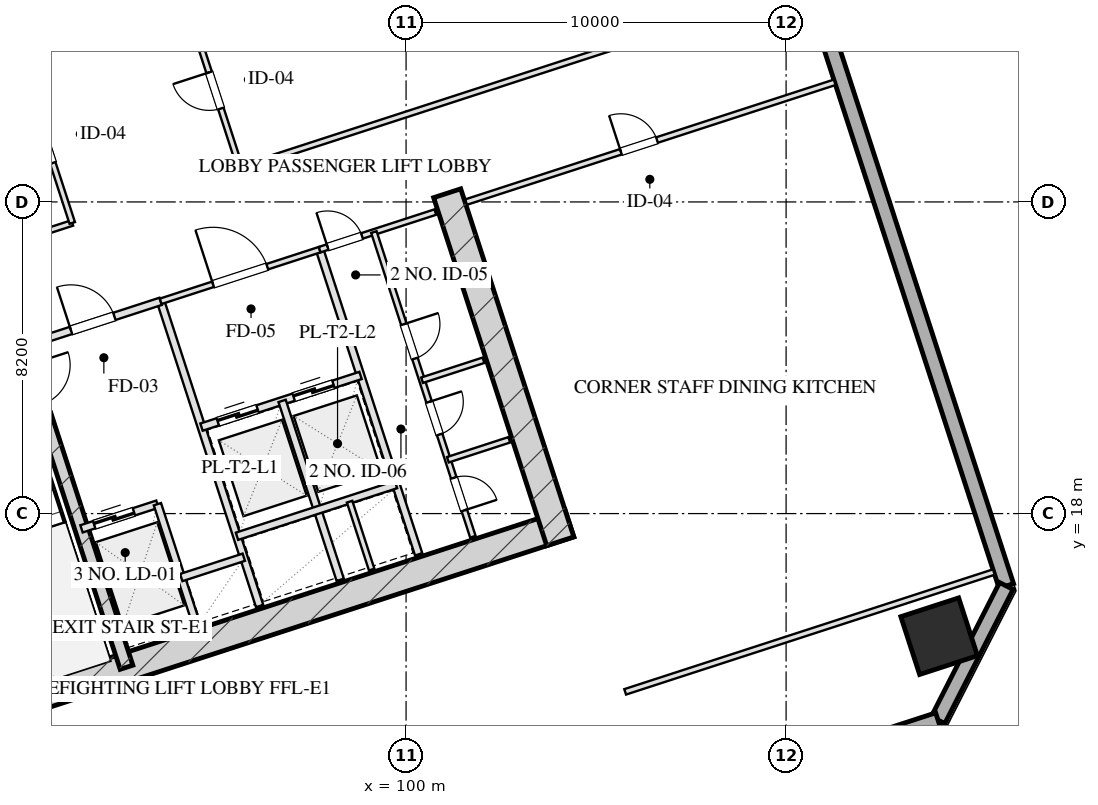
"""IFC4 building model, lengths in metres.
Left out: names, types, materials, properties, quantities, classifications, styles, units other than length and angle.
Written with IfcOpenShell. Run it as: python <this file> out.ifc"""

import sys

from ifc_helpers import new_model, si_unit, direction, frame, frame_2d, origin, origin_2d, place, context, subcontext, project, spatial, rectangle, hollow_rectangle, extrude, element, fill, save


model = new_model("IFC4")
c1 = context("Model", 3, precision=1e-05, world=origin(), true_north=direction((0.0, 1.0)))
c2 = subcontext(c1, "Body", "Model", "MODEL_VIEW")
j1 = project(units=[si_unit("LENGTHUNIT", "METRE"), si_unit("PLANEANGLEUNIT", "RADIAN")], contexts=[c1])
p1 = place(None, origin())
s1 = spatial("IfcSite", under=j1, at=p1, CompositionType="ELEMENT")
p2 = place(p1, origin())
s2 = spatial("IfcBuilding", under=s1, at=p2, CompositionType="ELEMENT")
p3 = place(p2, frame((0.0, 0.0, 64.4)))
s3 = spatial("IfcBuildingStorey", under=s2, at=p3, CompositionType="ELEMENT", Elevation=64.4)
p4 = place(p3, frame((88.559, 12.629, 0.0), z_axis=(0.0, 0.0, 1.0), x_axis=(0.951056072937, 0.309018358888, 0.0)))
e1 = element("IfcWall", 1, at=p4, inside=s3, PredefinedType="SHEAR", context=c2, shape_type="SweptSolid", body=[
    extrude(rectangle(XDim=16.55, YDim=0.75, at=frame_2d((8.275, 0.0))), origin(), (0.0, 0.0, 1.0), 3.45),
])
p5 = place(p3, frame((101.082, 26.429, 0.0), z_axis=(0.0, 0.0, 1.0), x_axis=(0.309016134813, -0.951056795583, 0.0)))
e2 = element("IfcWall", 2, at=p5, inside=s3, PredefinedType="SHEAR", context=c2, shape_type="SweptSolid", body=[
    extrude(rectangle(XDim=9.63, YDim=0.75, at=frame_2d((4.815, 0.0))), origin(), (0.0, 0.0, 1.0), 3.45),
])
p6 = place(p3, frame((90.486, 20.594, 0.0), z_axis=(0.0, 0.0, 1.0), x_axis=(0.309020428229, -0.951055400562, 0.0)))
e3 = element("IfcWall", 3, at=p6, inside=s3, PredefinedType="SHEAR", context=c2, shape_type="SweptSolid", body=[
    extrude(rectangle(XDim=6.98, YDim=0.35, at=frame_2d((3.49, 0.0))), origin(), (0.0, 0.0, 1.0), 3.45),
])
p7 = place(p3, frame((114.027, 14.774, 0.0), z_axis=(0.0, 0.0, 1.0), x_axis=(0.951056516295, 0.309016994375, 0.0)))
e4 = element("IfcColumn", 4, at=p7, inside=s3, PredefinedType="COLUMN", context=c2, shape_type="SweptSolid", body=[
    extrude(hollow_rectangle(XDim=1.6, YDim=1.6, WallThickness=0.055, at=origin_2d()), origin(), (0.0, 0.0, 1.0), 3.451),
])
p8 = place(p3, frame((100.345, 63.648, 0.0), z_axis=(0.0, 0.0, 1.0), x_axis=(0.309014526607, -0.951057318118, 0.0)))
e5 = element("IfcWall", 5, at=p8, inside=s3, PredefinedType="SOLIDWALL", context=c2, shape_type="SweptSolid", body=[
    extrude(rectangle(XDim=50.0, YDim=0.4, at=frame_2d((25.0, 0.0))), origin(), (0.0, 0.0, 1.0), 2.61),
])
p9 = place(p8, frame((30.15, 0.0, 0.75)))
e6 = element("IfcOpeningElement", 6, at=p9, cuts=e5, PredefinedType="OPENING", context=c2, shape_type="SweptSolid", body=[
    extrude(rectangle(XDim=2.5, YDim=1.46, at=frame_2d((1.25, 0.73))), frame((0.0, 0.21, 0.0), z_axis=(0.0, -1.0, 0.0), x_axis=(1.0, 0.0, 0.0)), (0.0, 0.0, 1.0), 0.42),
])
p10 = place(p8, frame((21.15, 0.0, 0.75)))
e7 = element("IfcOpeningElement", 7, at=p10, cuts=e5, PredefinedType="OPENING", context=c2, shape_type="SweptSolid", body=[
    extrude(rectangle(XDim=2.5, YDim=1.46, at=frame_2d((1.25, 0.73))), frame((0.0, 0.21, 0.0), z_axis=(0.0, -1.0, 0.0), x_axis=(1.0, 0.0, 0.0)), (0.0, 0.0, 1.0), 0.42),
])
p11 = place(p8, frame((17.35, 0.0, 0.75)))
e8 = element("IfcOpeningElement", 8, at=p11, cuts=e5, PredefinedType="OPENING", context=c2, shape_type="SweptSolid", body=[
    extrude(rectangle(XDim=2.5, YDim=1.46, at=frame_2d((1.25, 0.73))), frame((0.0, 0.21, 0.0), z_axis=(0.0, -1.0, 0.0), x_axis=(1.0, 0.0, 0.0)), (0.0, 0.0, 1.0), 0.42),
])
p12 = place(p3, frame((115.795, 16.095, 0.0), z_axis=(0.0, 0.0, 1.0), x_axis=(-0.453958106755, -0.891023028497, 0.0)))
e9 = element("IfcWall", 9, at=p12, inside=s3, PredefinedType="SOLIDWALL", context=c2, shape_type="SweptSolid", body=[
    extrude(rectangle(XDim=3.96, YDim=0.4, at=frame_2d((1.98, 0.0))), origin(), (0.0, 0.0, 1.0), 2.61),
])
p13 = place(p3, frame((113.998, 12.567, 0.0), z_axis=(0.0, 0.0, 1.0), x_axis=(-0.951055939317, -0.309018770125, 0.0)))
e10 = element("IfcWall", 10, at=p13, inside=s3, PredefinedType="SOLIDWALL", context=c2, shape_type="SweptSolid", body=[
    extrude(rectangle(XDim=32.4, YDim=0.4, at=frame_2d((16.2, 0.0))), origin(), (0.0, 0.0, 1.0), 2.61),
])
p14 = place(p3, frame((93.542, 23.585, 0.0), z_axis=(0.0, 0.0, 1.0), x_axis=(0.309042196757, -0.951048327176, 0.0)))
e11 = element("IfcWall", 11, at=p14, inside=s3, PredefinedType="PARTITIONING", context=c2, shape_type="SweptSolid", body=[
    extrude(rectangle(XDim=8.43, YDim=0.2, at=frame_2d((4.215, 0.0))), origin(), (0.0, 0.0, 1.0), 3.175),
])
p15 = place(p3, frame((89.899, 22.401, 0.0), z_axis=(0.0, 0.0, 1.0), x_axis=(0.951046716504, 0.309047153403, 0.0)))
e12 = element("IfcWall", 12, at=p15, inside=s3, PredefinedType="PARTITIONING", context=c2, shape_type="SweptSolid", body=[
    extrude(rectangle(XDim=3.83, YDim=0.2, at=frame_2d((1.915, 0.0))), origin(), (0.0, 0.0, 1.0), 3.175),
])
p16 = place(p15, frame((1.35, 0.0, 0.0)))
e13 = element("IfcOpeningElement", 13, at=p16, cuts=e12, PredefinedType="OPENING", context=c2, shape_type="SweptSolid", body=[
    extrude(rectangle(XDim=1.2, YDim=2.05, at=frame_2d((0.6, 1.025))), frame((0.0, 0.11, 0.0), z_axis=(0.0, -1.0, 0.0), x_axis=(1.0, 0.0, 0.0)), (0.0, 0.0, 1.0), 0.22),
])
p17 = place(p3, frame((91.46, 17.598, 0.0), z_axis=(0.0, 0.0, 1.0), x_axis=(0.951062257173, 0.308999325213, 0.0)))
e14 = element("IfcWall", 14, at=p17, inside=s3, PredefinedType="PARTITIONING", context=c2, shape_type="SweptSolid", body=[
    extrude(rectangle(XDim=2.1, YDim=0.2, at=frame_2d((1.05, 0.0))), origin(), (0.0, 0.0, 1.0), 3.175),
])
p18 = place(p17, frame((0.35, 0.0, 0.0)))
e15 = element("IfcOpeningElement", 15, at=p18, cuts=e14, PredefinedType="OPENING", context=c2, shape_type="SweptSolid", body=[
    extrude(rectangle(XDim=1.1, YDim=2.05, at=frame_2d((0.55, 1.025))), frame((0.0, 0.11, 0.0), z_axis=(0.0, -1.0, 0.0), x_axis=(1.0, 0.0, 0.0)), (0.0, 0.0, 1.0), 0.22),
])
p19 = place(p3, frame((93.457, 18.247, 0.0), z_axis=(0.0, 0.0, 1.0), x_axis=(0.3089935693, -0.951064127245, 0.0)))
e16 = element("IfcWall", 16, at=p19, inside=s3, PredefinedType="PARTITIONING", context=c2, shape_type="SweptSolid", body=[
    extrude(rectangle(XDim=3.7, YDim=0.2, at=frame_2d((1.85, 0.0))), origin(), (0.0, 0.0, 1.0), 3.175),
])
p20 = place(p3, frame((94.084, 16.317, 0.0), z_axis=(0.0, 0.0, 1.0), x_axis=(0.951041328149, 0.309063734775, 0.0)))
e17 = element("IfcWall", 17, at=p20, inside=s3, PredefinedType="PARTITIONING", context=c2, shape_type="SweptSolid", body=[
    extrude(rectangle(XDim=1.73, YDim=0.2, at=frame_2d((0.865, 0.0))), origin(), (0.0, 0.0, 1.0), 3.175),
])
p21 = place(p3, frame((97.727, 24.944, 0.0), z_axis=(0.0, 0.0, 1.0), x_axis=(0.309016001439, -0.951056838919, 0.0)))
e18 = element("IfcWall", 18, at=p21, inside=s3, PredefinedType="PARTITIONING", context=c2, shape_type="SweptSolid", body=[
    extrude(rectangle(XDim=8.43, YDim=0.2, at=frame_2d((4.215, 0.0))), origin(), (0.0, 0.0, 1.0), 3.175),
])
p22 = place(p3, frame((93.542, 23.585, 0.0), z_axis=(0.0, 0.0, 1.0), x_axis=(0.951063829732, 0.308994485023, 0.0)))
e19 = element("IfcWall", 19, at=p22, inside=s3, PredefinedType="PARTITIONING", context=c2, shape_type="SweptSolid", body=[
    extrude(rectangle(XDim=4.4, YDim=0.15, at=frame_2d((2.2, 0.0))), origin(), (0.0, 0.0, 1.0), 3.175),
])
p23 = place(p22, frame((1.45, 0.0, 0.0)))
e20 = element("IfcOpeningElement", 20, at=p23, cuts=e19, PredefinedType="OPENING", context=c2, shape_type="SweptSolid", body=[
    extrude(rectangle(XDim=1.5, YDim=2.05, at=frame_2d((0.75, 1.025))), frame((0.0, 0.085, 0.0), z_axis=(0.0, -1.0, 0.0), x_axis=(1.0, 0.0, 0.0)), (0.0, 0.0, 1.0), 0.17),
])
p24 = place(p3, frame((94.617, 20.275, 0.0), z_axis=(0.0, 0.0, 1.0), x_axis=(0.951058531764, 0.30901079133, 0.0)))
e21 = element("IfcWall", 21, at=p24, inside=s3, PredefinedType="PARTITIONING", context=c2, shape_type="SweptSolid", body=[
    extrude(rectangle(XDim=4.4, YDim=0.2, at=frame_2d((2.2, 0.0))), origin(), (0.0, 0.0, 1.0), 3.175),
])
p25 = place(p24, frame((0.45, 0.0, 0.0)))
e22 = element("IfcOpeningElement", 22, at=p25, cuts=e21, PredefinedType="OPENING", context=c2, shape_type="SweptSolid", body=[
    extrude(rectangle(XDim=1.1, YDim=2.05, at=frame_2d((0.55, 1.025))), frame((0.0, 0.11, 0.0), z_axis=(0.0, -1.0, 0.0), x_axis=(1.0, 0.0, 0.0)), (0.0, 0.0, 1.0), 0.22),
])
p26 = place(p24, frame((2.55, 0.0, 0.0)))
e23 = element("IfcOpeningElement", 23, at=p26, cuts=e21, PredefinedType="OPENING", context=c2, shape_type="SweptSolid", body=[
    extrude(rectangle(XDim=1.1, YDim=2.05, at=frame_2d((0.55, 1.025))), frame((0.0, 0.11, 0.0), z_axis=(0.0, -1.0, 0.0), x_axis=(1.0, 0.0, 0.0)), (0.0, 0.0, 1.0), 0.22),
])
p27 = place(p3, frame((96.738, 20.964, 0.0), z_axis=(0.0, 0.0, 1.0), x_axis=(0.309042578481, -0.951048203135, 0.0)))
e24 = element("IfcWall", 24, at=p27, inside=s3, PredefinedType="PARTITIONING", context=c2, shape_type="SweptSolid", body=[
    extrude(rectangle(XDim=4.95, YDim=0.2, at=frame_2d((2.475, 0.0))), origin(), (0.0, 0.0, 1.0), 3.175),
])
p28 = place(p3, frame((95.551, 17.403, 0.0), z_axis=(0.0, 0.0, 1.0), x_axis=(0.951058531764, 0.30901079133, 0.0)))
e25 = element("IfcWall", 25, at=p28, inside=s3, PredefinedType="PARTITIONING", context=c2, shape_type="SweptSolid", body=[
    extrude(rectangle(XDim=4.4, YDim=0.2, at=frame_2d((2.2, 0.0))), origin(), (0.0, 0.0, 1.0), 3.175),
])
p29 = place(p3, frame((98.514, 18.313, 0.0), z_axis=(0.0, 0.0, 1.0), x_axis=(0.309089008895, -0.951033114345, 0.0)))
e26 = element("IfcWall", 26, at=p29, inside=s3, PredefinedType="PARTITIONING", context=c2, shape_type="SweptSolid", body=[
    extrude(rectangle(XDim=1.88, YDim=0.15, at=frame_2d((0.94, 0.0))), origin(), (0.0, 0.0, 1.0), 3.175),
])
p30 = place(p3, frame((97.727, 24.944, 0.0), z_axis=(0.0, 0.0, 1.0), x_axis=(0.951036872128, 0.309077446369, 0.0)))
e27 = element("IfcWall", 27, at=p30, inside=s3, PredefinedType="PARTITIONING", context=c2, shape_type="SweptSolid", body=[
    extrude(rectangle(XDim=3.2, YDim=0.15, at=frame_2d((1.6, 0.0))), origin(), (0.0, 0.0, 1.0), 3.175),
])
p31 = place(p30, frame((0.22, 0.0, 0.0)))
e28 = element("IfcOpeningElement", 28, at=p31, cuts=e27, PredefinedType="OPENING", context=c2, shape_type="SweptSolid", body=[
    extrude(rectangle(XDim=0.95, YDim=2.05, at=frame_2d((0.475, 1.025))), frame((0.0, 0.085, 0.0), z_axis=(0.0, -1.0, 0.0), x_axis=(1.0, 0.0, 0.0)), (0.0, 0.0, 1.0), 0.17),
])
p32 = place(p3, frame((99.153, 25.408, 0.0), z_axis=(0.0, 0.0, 1.0), x_axis=(0.309016001439, -0.951056838919, 0.0)))
e29 = element("IfcWall", 29, at=p32, inside=s3, PredefinedType="PARTITIONING", context=c2, shape_type="SweptSolid", body=[
    extrude(rectangle(XDim=8.43, YDim=0.15, at=frame_2d((4.215, 0.0))), origin(), (0.0, 0.0, 1.0), 3.175),
])
p33 = place(p32, frame((2.55, 0.0, 0.0)))
e30 = element("IfcOpeningElement", 30, at=p33, cuts=e29, PredefinedType="OPENING", context=c2, shape_type="SweptSolid", body=[
    extrude(rectangle(XDim=0.95, YDim=2.05, at=frame_2d((0.475, 1.025))), frame((0.0, 0.085, 0.0), z_axis=(0.0, -1.0, 0.0), x_axis=(1.0, 0.0, 0.0)), (0.0, 0.0, 1.0), 0.17),
])
p34 = place(p32, frame((4.7, 0.0, 0.0)))
e31 = element("IfcOpeningElement", 31, at=p34, cuts=e29, PredefinedType="OPENING", context=c2, shape_type="SweptSolid", body=[
    extrude(rectangle(XDim=0.9, YDim=2.05, at=frame_2d((0.45, 1.025))), frame((0.0, 0.085, 0.0), z_axis=(0.0, -1.0, 0.0), x_axis=(1.0, 0.0, 0.0)), (0.0, 0.0, 1.0), 0.17),
])
p35 = place(p32, frame((6.8, 0.0, 0.0)))
e32 = element("IfcOpeningElement", 32, at=p35, cuts=e29, PredefinedType="OPENING", context=c2, shape_type="SweptSolid", body=[
    extrude(rectangle(XDim=0.9, YDim=2.05, at=frame_2d((0.45, 1.025))), frame((0.0, 0.085, 0.0), z_axis=(0.0, -1.0, 0.0), x_axis=(1.0, 0.0, 0.0)), (0.0, 0.0, 1.0), 0.17),
])
p36 = place(p3, frame((100.42, 21.509, 0.0), z_axis=(0.0, 0.0, 1.0), x_axis=(0.951040401051, 0.309066587596, 0.0)))
e33 = element("IfcWall", 33, at=p36, inside=s3, PredefinedType="PARTITIONING", context=c2, shape_type="SweptSolid", body=[
    extrude(rectangle(XDim=1.7, YDim=0.15, at=frame_2d((0.85, 0.0))), origin(), (0.0, 0.0, 1.0), 3.175),
])
p37 = place(p3, frame((101.1, 19.416, 0.0), z_axis=(0.0, 0.0, 1.0), x_axis=(0.951054116971, 0.309024378638, 0.0)))
e34 = element("IfcWall", 34, at=p37, inside=s3, PredefinedType="PARTITIONING", context=c2, shape_type="SweptSolid", body=[
    extrude(rectangle(XDim=1.7, YDim=0.15, at=frame_2d((0.85, 0.0))), origin(), (0.0, 0.0, 1.0), 3.175),
])
p38 = place(p3, frame((105.765, 13.309, 0.0), z_axis=(0.0, 0.0, 1.0), x_axis=(0.951054294345, 0.309023832749, 0.0)))
e35 = element("IfcWall", 35, at=p38, inside=s3, PredefinedType="PARTITIONING", context=c2, shape_type="SweptSolid", body=[
    extrude(rectangle(XDim=10.2, YDim=0.15, at=frame_2d((5.1, 0.0))), origin(), (0.0, 0.0, 1.0), 3.175),
])
p39 = place(p3, frame((101.578, 26.196, 0.0), z_axis=(0.0, 0.0, 1.0), x_axis=(0.951059043131, 0.309009217467, 0.0)))
e36 = element("IfcWall", 36, at=p39, inside=s3, PredefinedType="PARTITIONING", context=c2, shape_type="SweptSolid", body=[
    extrude(rectangle(XDim=10.2, YDim=0.15, at=frame_2d((5.1, 0.0))), origin(), (0.0, 0.0, 1.0), 3.175),
])
p40 = place(p39, frame((4.284, 0.0, 0.0)))
e37 = element("IfcOpeningElement", 37, at=p40, cuts=e36, PredefinedType="OPENING", context=c2, shape_type="SweptSolid", body=[
    extrude(rectangle(XDim=1.0, YDim=2.05, at=frame_2d((0.5, 1.025))), frame((0.0, 0.085, 0.0), z_axis=(0.0, -1.0, 0.0), x_axis=(1.0, 0.0, 0.0)), (0.0, 0.0, 1.0), 0.17),
])
p41 = place(p3, frame((74.691, 20.278, 0.0), z_axis=(0.0, 0.0, 1.0), x_axis=(0.951053169828, 0.309027293551, 0.0)))
e38 = element("IfcWall", 38, at=p41, inside=s3, PredefinedType="PARTITIONING", context=c2, shape_type="SweptSolid", body=[
    extrude(rectangle(XDim=17.375, YDim=0.15, at=frame_2d((8.688, 0.0))), origin(), (0.0, 0.0, 1.0), 3.175),
])
p42 = place(p3, frame((95.638, 27.084, 0.0), z_axis=(0.0, 0.0, 1.0), x_axis=(0.951055837847, 0.309019082414, 0.0)))
e39 = element("IfcWall", 39, at=p42, inside=s3, PredefinedType="PARTITIONING", context=c2, shape_type="SweptSolid", body=[
    extrude(rectangle(XDim=15.575, YDim=0.15, at=frame_2d((7.788, 0.0))), origin(), (0.0, 0.0, 1.0), 3.175),
])
p43 = place(p3, frame((91.216, 25.647, 0.0), z_axis=(0.0, 0.0, 1.0), x_axis=(-0.309022042254, 0.951054876125, 0.0)))
e40 = element("IfcWall", 40, at=p43, inside=s3, PredefinedType="PARTITIONING", context=c2, shape_type="SweptSolid", body=[
    extrude(rectangle(XDim=16.64, YDim=0.15, at=frame_2d((8.32, 0.0))), origin(), (0.0, 0.0, 1.0), 3.175),
])
p44 = place(p43, frame((1.66, 0.0, 0.0)))
e41 = element("IfcOpeningElement", 41, at=p44, cuts=e40, PredefinedType="OPENING", context=c2, shape_type="SweptSolid", body=[
    extrude(rectangle(XDim=1.0, YDim=2.05, at=frame_2d((0.5, 1.025))), frame((0.0, 0.085, 0.0), z_axis=(0.0, -1.0, 0.0), x_axis=(1.0, 0.0, 0.0)), (0.0, 0.0, 1.0), 0.17),
])
p45 = place(p43, frame((7.82, 0.0, 0.0)))
e42 = element("IfcOpeningElement", 42, at=p45, cuts=e40, PredefinedType="OPENING", context=c2, shape_type="SweptSolid", body=[
    extrude(rectangle(XDim=1.05, YDim=2.05, at=frame_2d((0.525, 1.025))), frame((0.0, 0.085, 0.0), z_axis=(0.0, -1.0, 0.0), x_axis=(1.0, 0.0, 0.0)), (0.0, 0.0, 1.0), 0.17),
])
p46 = place(p43, frame((13.98, 0.0, 0.0)))
e43 = element("IfcOpeningElement", 43, at=p46, cuts=e40, PredefinedType="OPENING", context=c2, shape_type="SweptSolid", body=[
    extrude(rectangle(XDim=1.0, YDim=2.05, at=frame_2d((0.5, 1.025))), frame((0.0, 0.085, 0.0), z_axis=(0.0, -1.0, 0.0), x_axis=(1.0, 0.0, 0.0)), (0.0, 0.0, 1.0), 0.17),
])
p47 = place(p3, frame((95.638, 27.084, 0.0), z_axis=(0.0, 0.0, 1.0), x_axis=(-0.30901773025, 0.951056277195, 0.0)))
e44 = element("IfcWall", 44, at=p47, inside=s3, PredefinedType="PARTITIONING", context=c2, shape_type="SweptSolid", body=[
    extrude(rectangle(XDim=16.64, YDim=0.15, at=frame_2d((8.32, 0.0))), origin(), (0.0, 0.0, 1.0), 3.175),
])
p48 = place(p47, frame((1.655, 0.0, 0.0)))
e45 = element("IfcOpeningElement", 45, at=p48, cuts=e44, PredefinedType="OPENING", context=c2, shape_type="SweptSolid", body=[
    extrude(rectangle(XDim=1.0, YDim=2.05, at=frame_2d((0.5, 1.025))), frame((0.0, 0.085, 0.0), z_axis=(0.0, -1.0, 0.0), x_axis=(1.0, 0.0, 0.0)), (0.0, 0.0, 1.0), 0.17),
])
p49 = place(p47, frame((6.155, 0.0, 0.0)))
e46 = element("IfcOpeningElement", 46, at=p49, cuts=e44, PredefinedType="OPENING", context=c2, shape_type="SweptSolid", body=[
    extrude(rectangle(XDim=1.0, YDim=2.05, at=frame_2d((0.5, 1.025))), frame((0.0, 0.085, 0.0), z_axis=(0.0, -1.0, 0.0), x_axis=(1.0, 0.0, 0.0)), (0.0, 0.0, 1.0), 0.17),
])
p50 = place(p47, frame((10.565, 0.0, 0.0)))
e47 = element("IfcOpeningElement", 47, at=p50, cuts=e44, PredefinedType="OPENING", context=c2, shape_type="SweptSolid", body=[
    extrude(rectangle(XDim=1.0, YDim=2.05, at=frame_2d((0.5, 1.025))), frame((0.0, 0.085, 0.0), z_axis=(0.0, -1.0, 0.0), x_axis=(1.0, 0.0, 0.0)), (0.0, 0.0, 1.0), 0.17),
])
p51 = place(p47, frame((14.385, 0.0, 0.0)))
e48 = element("IfcOpeningElement", 48, at=p51, cuts=e44, PredefinedType="OPENING", context=c2, shape_type="SweptSolid", body=[
    extrude(rectangle(XDim=1.0, YDim=2.05, at=frame_2d((0.5, 1.025))), frame((0.0, 0.085, 0.0), z_axis=(0.0, -1.0, 0.0), x_axis=(1.0, 0.0, 0.0)), (0.0, 0.0, 1.0), 0.17),
])
p52 = place(p16, origin())
e49 = element("IfcDoor", 49, at=p52, inside=s3, OperationType="SINGLE_SWING_LEFT", PredefinedType="DOOR", context=c2, shape_type="SweptSolid", body=[
    extrude(rectangle(XDim=1.2, YDim=2.05, at=frame_2d((0.6, 1.025))), frame((0.0, 0.025, 0.0), z_axis=(0.0, -1.0, 0.0), x_axis=(1.0, 0.0, 0.0)), (0.0, 0.0, 1.0), 0.05),
])
fill(e13, e49)
p53 = place(p18, origin())
e50 = element("IfcDoor", 50, at=p53, inside=s3, OperationType="DOUBLE_DOOR_SLIDING", PredefinedType="DOOR", context=c2, shape_type="SweptSolid", body=[
    extrude(rectangle(XDim=1.1, YDim=2.05, at=frame_2d((0.55, 1.025))), frame((0.0, 0.025, 0.0), z_axis=(0.0, -1.0, 0.0), x_axis=(1.0, 0.0, 0.0)), (0.0, 0.0, 1.0), 0.05),
])
fill(e15, e50)
p54 = place(p23, origin())
e51 = element("IfcDoor", 51, at=p54, inside=s3, OperationType="SINGLE_SWING_LEFT", PredefinedType="DOOR", context=c2, shape_type="SweptSolid", body=[
    extrude(rectangle(XDim=1.5, YDim=2.05, at=frame_2d((0.75, 1.025))), frame((0.0, 0.025, 0.0), z_axis=(0.0, -1.0, 0.0), x_axis=(1.0, 0.0, 0.0)), (0.0, 0.0, 1.0), 0.05),
])
fill(e20, e51)
p55 = place(p25, origin())
e52 = element("IfcDoor", 52, at=p55, inside=s3, OperationType="DOUBLE_DOOR_SLIDING", PredefinedType="DOOR", context=c2, shape_type="SweptSolid", body=[
    extrude(rectangle(XDim=1.1, YDim=2.05, at=frame_2d((0.55, 1.025))), frame((0.0, 0.025, 0.0), z_axis=(0.0, -1.0, 0.0), x_axis=(1.0, 0.0, 0.0)), (0.0, 0.0, 1.0), 0.05),
])
fill(e22, e52)
p56 = place(p26, origin())
e53 = element("IfcDoor", 53, at=p56, inside=s3, OperationType="DOUBLE_DOOR_SLIDING", PredefinedType="DOOR", context=c2, shape_type="SweptSolid", body=[
    extrude(rectangle(XDim=1.1, YDim=2.05, at=frame_2d((0.55, 1.025))), frame((0.0, 0.025, 0.0), z_axis=(0.0, -1.0, 0.0), x_axis=(1.0, 0.0, 0.0)), (0.0, 0.0, 1.0), 0.05),
])
fill(e23, e53)
p57 = place(p31, origin())
e54 = element("IfcDoor", 54, at=p57, inside=s3, OperationType="SINGLE_SWING_LEFT", PredefinedType="DOOR", context=c2, shape_type="SweptSolid", body=[
    extrude(rectangle(XDim=0.95, YDim=2.05, at=frame_2d((0.475, 1.025))), frame((0.0, 0.025, 0.0), z_axis=(0.0, -1.0, 0.0), x_axis=(1.0, 0.0, 0.0)), (0.0, 0.0, 1.0), 0.05),
])
fill(e28, e54)
p58 = place(p33, origin())
e55 = element("IfcDoor", 55, at=p58, inside=s3, OperationType="SINGLE_SWING_LEFT", PredefinedType="DOOR", context=c2, shape_type="SweptSolid", body=[
    extrude(rectangle(XDim=0.95, YDim=2.05, at=frame_2d((0.475, 1.025))), frame((0.0, 0.025, 0.0), z_axis=(0.0, -1.0, 0.0), x_axis=(1.0, 0.0, 0.0)), (0.0, 0.0, 1.0), 0.05),
])
fill(e30, e55)
p59 = place(p34, origin())
e56 = element("IfcDoor", 56, at=p59, inside=s3, OperationType="SINGLE_SWING_LEFT", PredefinedType="DOOR", context=c2, shape_type="SweptSolid", body=[
    extrude(rectangle(XDim=0.9, YDim=2.05, at=frame_2d((0.45, 1.025))), frame((0.0, 0.025, 0.0), z_axis=(0.0, -1.0, 0.0), x_axis=(1.0, 0.0, 0.0)), (0.0, 0.0, 1.0), 0.05),
])
fill(e31, e56)
p60 = place(p35, origin())
e57 = element("IfcDoor", 57, at=p60, inside=s3, OperationType="SINGLE_SWING_RIGHT", PredefinedType="DOOR", context=c2, shape_type="SweptSolid", body=[
    extrude(rectangle(XDim=0.9, YDim=2.05, at=frame_2d((0.45, 1.025))), frame((0.0, 0.025, 0.0), z_axis=(0.0, -1.0, 0.0), x_axis=(1.0, 0.0, 0.0)), (0.0, 0.0, 1.0), 0.05),
])
fill(e32, e57)
p61 = place(p40, origin())
e58 = element("IfcDoor", 58, at=p61, inside=s3, OperationType="SINGLE_SWING_LEFT", PredefinedType="DOOR", context=c2, shape_type="SweptSolid", body=[
    extrude(rectangle(XDim=1.0, YDim=2.05, at=frame_2d((0.5, 1.025))), frame((0.0, 0.025, 0.0), z_axis=(0.0, -1.0, 0.0), x_axis=(1.0, 0.0, 0.0)), (0.0, 0.0, 1.0), 0.05),
])
fill(e37, e58)
p62 = place(p44, origin())
e59 = element("IfcDoor", 59, at=p62, inside=s3, OperationType="SINGLE_SWING_LEFT", PredefinedType="DOOR", context=c2, shape_type="SweptSolid", body=[
    extrude(rectangle(XDim=1.0, YDim=2.05, at=frame_2d((0.5, 1.025))), frame((0.0, 0.025, 0.0), z_axis=(0.0, -1.0, 0.0), x_axis=(1.0, 0.0, 0.0)), (0.0, 0.0, 1.0), 0.05),
])
fill(e41, e59)
p63 = place(p48, origin())
e60 = element("IfcDoor", 60, at=p63, inside=s3, OperationType="SINGLE_SWING_RIGHT", PredefinedType="DOOR", context=c2, shape_type="SweptSolid", body=[
    extrude(rectangle(XDim=1.0, YDim=2.05, at=frame_2d((0.5, 1.025))), frame((0.0, 0.025, 0.0), z_axis=(0.0, -1.0, 0.0), x_axis=(1.0, 0.0, 0.0)), (0.0, 0.0, 1.0), 0.05),
])
fill(e45, e60)
save(model, sys.argv[1])
